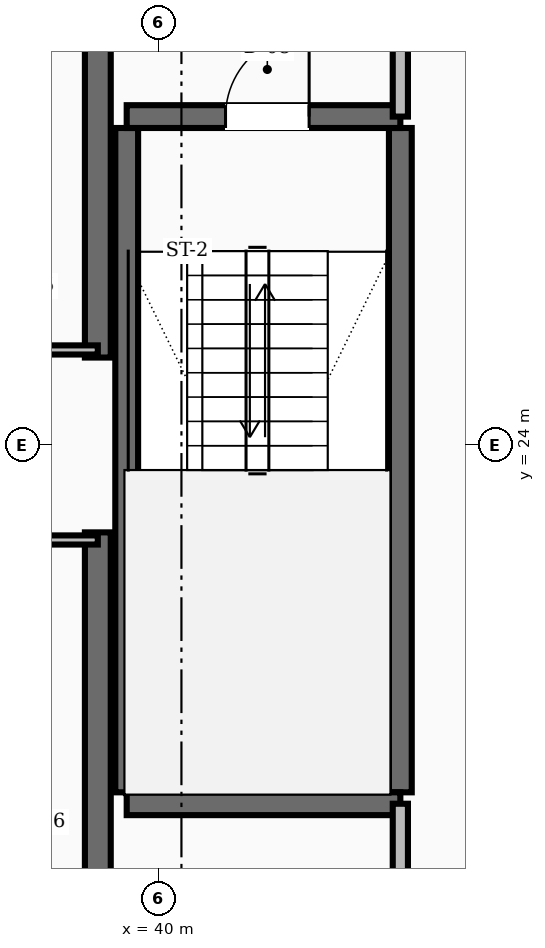
"""IFC4 building model, lengths in metres.
Left out: names, types, materials, properties, quantities, classifications, styles, units other than length and angle.
Written with IfcOpenShell. Run it as: python <this file> out.ifc"""

import sys

from ifc_helpers import new_model, si_unit, direction, frame, frame_2d, origin, place, context, subcontext, project, spatial, rectangle, extrude, element, fill, save


model = new_model("IFC4")
c1 = context("Model", 3, precision=1e-05, world=origin(), true_north=direction((0.0, 1.0)))
c2 = subcontext(c1, "Body", "Model", "MODEL_VIEW")
j1 = project(units=[si_unit("LENGTHUNIT", "METRE"), si_unit("PLANEANGLEUNIT", "RADIAN")], contexts=[c1])
p1 = place(None, origin())
s1 = spatial("IfcSite", under=j1, at=p1, CompositionType="ELEMENT")
p2 = place(p1, origin())
s2 = spatial("IfcBuilding", under=s1, at=p2, CompositionType="ELEMENT")
p3 = place(p2, frame((0.0, 0.0, 160.4)))
s3 = spatial("IfcBuildingStorey", under=s2, at=p3, CompositionType="ELEMENT", Elevation=160.4)
for number, where, z_axis, x_axis in (
    (1, (39.2, 16.55, 0.0), (0.0, 0.0, 1.0), (0.0, 1.0, 0.0)),
    (2, (39.2, 25.15, 0.0), (0.0, 0.0, 1.0), (0.0, 1.0, 0.0)),
):
    element("IfcWall", number, at=place(p3, frame(where, z_axis=z_axis, x_axis=x_axis)), inside=s3, PredefinedType="SHEAR", context=c2, shape_type="SweptSolid", body=[
        extrude(rectangle(XDim=6.3, YDim=0.34, at=frame_2d((3.15, 0.0))), origin(), (0.0, 0.0, 1.0), 3.6),
    ])
for number, where, z_axis, x_axis in (
    (3, (43.18, 19.43, 0.0), (0.0, 0.0, 1.0), (0.0, 1.0, 0.0)),
    (4, (39.58, 19.43, 0.0), (0.0, 0.0, 1.0), (0.0, 1.0, 0.0)),
):
    element("IfcWall", number, at=place(p3, frame(where, z_axis=z_axis, x_axis=x_axis)), inside=s3, PredefinedType="SHEAR", context=c2, shape_type="SweptSolid", body=[
        extrude(rectangle(XDim=8.74, YDim=0.3, at=frame_2d((4.37, 0.0))), origin(), (0.0, 0.0, 1.0), 3.6),
    ])
p4 = place(p3, frame((39.58, 19.28, 0.0), z_axis=(0.0, 0.0, 1.0), x_axis=(1.0, 0.0, 0.0)))
e5 = element("IfcWall", 5, at=p4, inside=s3, PredefinedType="SHEAR", context=c2, shape_type="SweptSolid", body=[
    extrude(rectangle(XDim=3.6, YDim=0.3, at=frame_2d((1.8, 0.0))), origin(), (0.0, 0.0, 1.0), 3.6),
])
p5 = place(p3, frame((39.58, 28.32, 0.0), z_axis=(0.0, 0.0, 1.0), x_axis=(1.0, 0.0, 0.0)))
e6 = element("IfcWall", 6, at=p5, inside=s3, PredefinedType="SHEAR", context=c2, shape_type="SweptSolid", body=[
    extrude(rectangle(XDim=3.6, YDim=0.3, at=frame_2d((1.8, 0.0))), origin(), (0.0, 0.0, 1.0), 3.6),
])
p6 = place(p5, frame((1.3, 0.0, 0.0)))
e7 = element("IfcOpeningElement", 7, at=p6, cuts=e6, PredefinedType="OPENING", context=c2, shape_type="SweptSolid", body=[
    extrude(rectangle(XDim=1.1, YDim=2.1, at=frame_2d((0.55, 1.05))), frame((0.0, 0.16, 0.0), z_axis=(0.0, -1.0, 0.0), x_axis=(1.0, 0.0, 0.0)), (0.0, 0.0, 1.0), 0.32),
])
p7 = place(p3, frame((43.18, 28.32, 0.0), z_axis=(0.0, 0.0, 1.0), x_axis=(0.0, 1.0, 0.0)))
e8 = element("IfcWall", 8, at=p7, inside=s3, PredefinedType="SOLIDWALL", context=c2, shape_type="SweptSolid", body=[
    extrude(rectangle(XDim=3.13, YDim=0.2, at=frame_2d((1.565, 0.0))), origin(), (0.0, 0.0, 1.0), 2.8),
])
p8 = place(p7, frame((1.015, 0.0, 0.0)))
e9 = element("IfcOpeningElement", 9, at=p8, cuts=e8, PredefinedType="OPENING", context=c2, shape_type="SweptSolid", body=[
    extrude(rectangle(XDim=1.1, YDim=2.1, at=frame_2d((0.55, 1.05))), frame((0.0, 0.11, 0.0), z_axis=(0.0, -1.0, 0.0), x_axis=(1.0, 0.0, 0.0)), (0.0, 0.0, 1.0), 0.22),
])
p9 = place(p3, frame((43.18, 16.55, 0.0), z_axis=(0.0, 0.0, 1.0), x_axis=(0.0, 1.0, 0.0)))
e10 = element("IfcWall", 10, at=p9, inside=s3, PredefinedType="SOLIDWALL", context=c2, shape_type="SweptSolid", body=[
    extrude(rectangle(XDim=2.73, YDim=0.2, at=frame_2d((1.365, 0.0))), origin(), (0.0, 0.0, 1.0), 2.8),
])
p10 = place(p9, frame((0.89, 0.0, 0.0)))
e11 = element("IfcOpeningElement", 11, at=p10, cuts=e10, PredefinedType="OPENING", context=c2, shape_type="SweptSolid", body=[
    extrude(rectangle(XDim=0.95, YDim=2.1, at=frame_2d((0.475, 1.05))), frame((0.0, 0.11, 0.0), z_axis=(0.0, -1.0, 0.0), x_axis=(1.0, 0.0, 0.0)), (0.0, 0.0, 1.0), 0.22),
])
for number, where, z_axis, x_axis in (
    (12, (37.4, 25.25, 0.0), (0.0, 0.0, 1.0), (1.0, 0.0, 0.0)),
    (13, (37.4, 22.75, 0.0), (0.0, 0.0, 1.0), (1.0, 0.0, 0.0)),
):
    element("IfcWall", number, at=place(p3, frame(where, z_axis=z_axis, x_axis=x_axis)), inside=s3, PredefinedType="PARTITIONING", context=c2, shape_type="SweptSolid", body=[
        extrude(rectangle(XDim=1.8, YDim=0.12, at=frame_2d((0.9, 0.0))), origin(), (0.0, 0.0, 1.0), 2.8),
    ])
p11 = place(p6, origin())
e14 = element("IfcDoor", 14, at=p11, inside=s3, OperationType="SINGLE_SWING_RIGHT", PredefinedType="DOOR", context=c2, shape_type="SweptSolid", body=[
    extrude(rectangle(XDim=1.1, YDim=2.1, at=frame_2d((0.55, 1.05))), frame((0.0, 0.025, 0.0), z_axis=(0.0, -1.0, 0.0), x_axis=(1.0, 0.0, 0.0)), (0.0, 0.0, 1.0), 0.05),
])
fill(e7, e14)
save(model, sys.argv[1])
